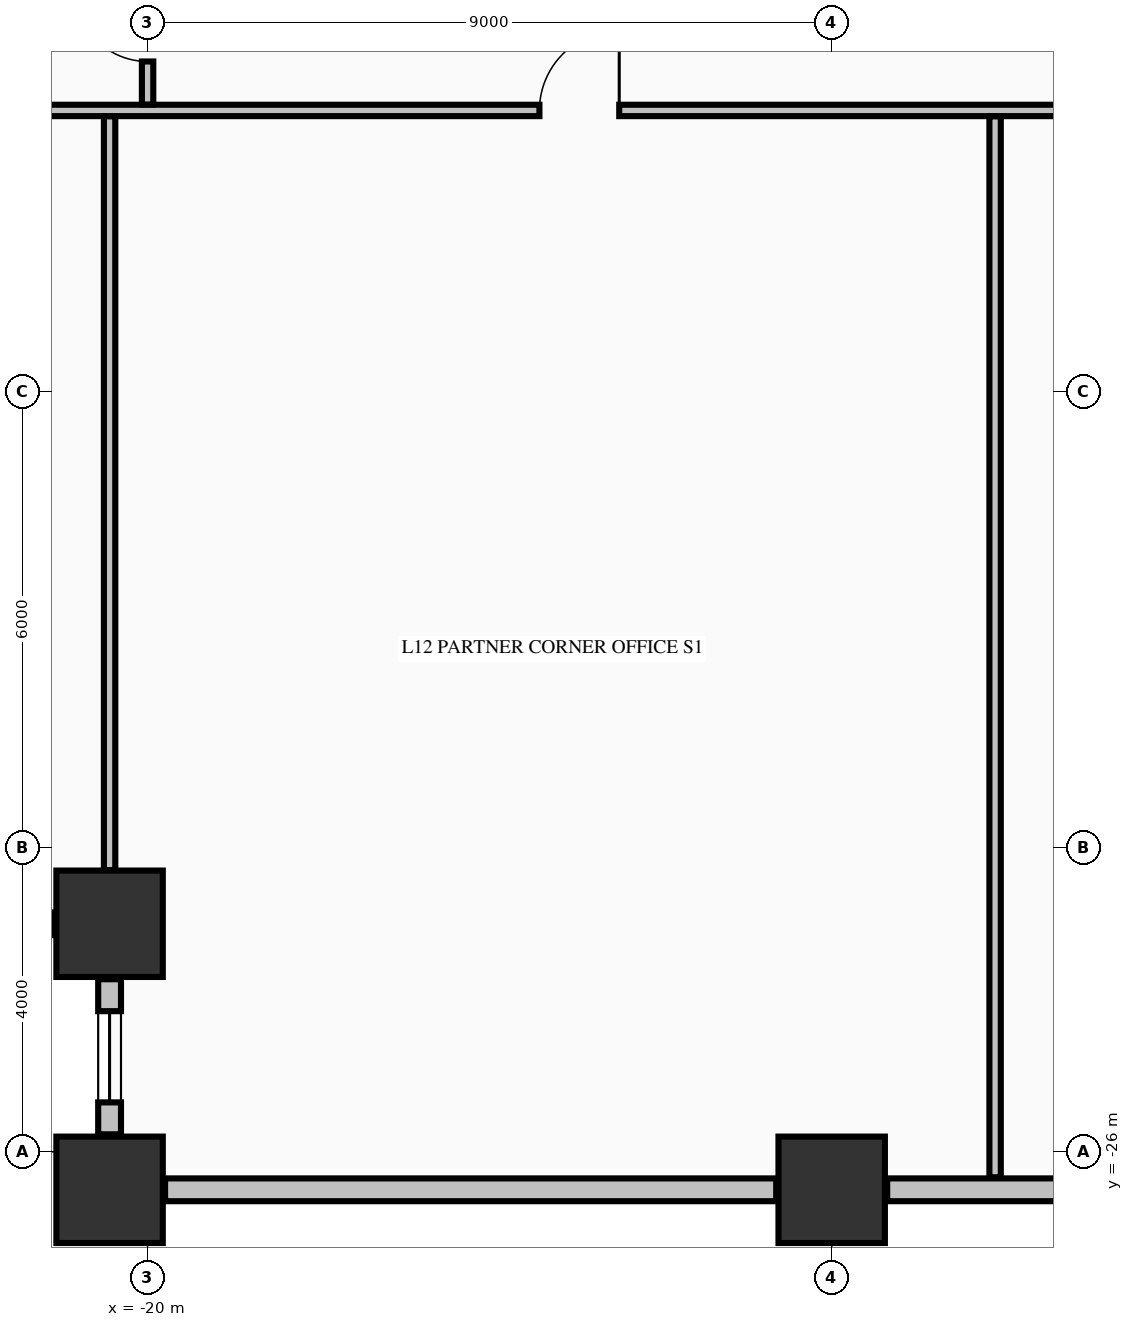
"""IFC4 building model, lengths in metres.
Left out: names, types, materials, properties, quantities, classifications, styles, units other than length and angle.
Written with IfcOpenShell. Run it as: python <this file> out.ifc"""

import sys

from ifc_helpers import new_model, si_unit, direction, frame, frame_2d, origin, origin_2d, place, context, subcontext, project, spatial, rectangle, extrude, element, fill, save


model = new_model("IFC4")
c1 = context("Model", 3, precision=1e-05, world=origin(), true_north=direction((0.0, 1.0)))
c2 = subcontext(c1, "Body", "Model", "MODEL_VIEW")
j1 = project(units=[si_unit("LENGTHUNIT", "METRE"), si_unit("PLANEANGLEUNIT", "RADIAN")], contexts=[c1])
p1 = place(None, origin())
s1 = spatial("IfcSite", under=j1, at=p1, CompositionType="ELEMENT")
p2 = place(p1, origin())
s2 = spatial("IfcBuilding", under=s1, at=p2, CompositionType="ELEMENT")
p3 = place(p2, frame((0.0, 0.0, 52.19)))
s3 = spatial("IfcBuildingStorey", under=s2, at=p3, CompositionType="ELEMENT", Elevation=52.19)
for number, where, z_axis, x_axis in (
    (1, (-20.5, -26.5, -0.425), (0.0, 0.0, 1.0), (1.0, 0.0, 0.0)),
    (2, (-11.0, -26.5, -0.425), (0.0, 0.0, 1.0), (1.0, 0.0, 0.0)),
    (3, (-20.5, -23.0, -0.425), (0.0, 0.0, 1.0), (1.0, 0.0, 0.0)),
):
    element("IfcColumn", number, at=place(p3, frame(where, z_axis=z_axis, x_axis=x_axis)), inside=s3, PredefinedType="COLUMN", context=c2, shape_type="SweptSolid", body=[
        extrude(rectangle(XDim=1.4, YDim=1.4, at=origin_2d()), origin(), (0.0, 0.0, 1.0), 5.0),
    ])
p4 = place(p3, frame((-23.27, -23.0, 0.0), z_axis=(0.0, 0.0, 1.0), x_axis=(1.0, 0.0, 0.0)))
e4 = element("IfcWall", 4, at=p4, inside=s3, PredefinedType="STANDARD", context=c2, shape_type="SweptSolid", body=[
    extrude(rectangle(XDim=2.04, YDim=0.3, at=frame_2d((1.02, 0.0))), origin(), (0.0, 0.0, 1.0), 2.167),
])
p5 = place(p3, frame((-20.5, -23.73, 0.0), z_axis=(0.0, 0.0, 1.0), x_axis=(0.0, -1.0, 0.0)))
e5 = element("IfcWall", 5, at=p5, inside=s3, PredefinedType="STANDARD", context=c2, shape_type="SweptSolid", body=[
    extrude(rectangle(XDim=2.04, YDim=0.3, at=frame_2d((1.02, 0.0))), origin(), (0.0, 0.0, 1.0), 2.767),
])
p6 = place(p5, frame((0.42, 0.0, 0.82)))
e6 = element("IfcOpeningElement", 6, at=p6, cuts=e5, PredefinedType="OPENING", context=c2, shape_type="SweptSolid", body=[
    extrude(rectangle(XDim=1.2, YDim=1.65, at=frame_2d((0.6, 0.825))), frame((0.0, 0.16, 0.0), z_axis=(0.0, -1.0, 0.0), x_axis=(1.0, 0.0, 0.0)), (0.0, 0.0, 1.0), 0.32),
])
p7 = place(p3, frame((-19.77, -26.5, 0.0), z_axis=(0.0, 0.0, 1.0), x_axis=(1.0, 0.0, 0.0)))
e7 = element("IfcWall", 7, at=p7, inside=s3, PredefinedType="STANDARD", context=c2, shape_type="SweptSolid", body=[
    extrude(rectangle(XDim=8.04, YDim=0.3, at=frame_2d((4.02, 0.0))), origin(), (0.0, 0.0, 1.0), 2.167),
])
p8 = place(p3, frame((-10.27, -26.5, 0.0), z_axis=(0.0, 0.0, 1.0), x_axis=(1.0, 0.0, 0.0)))
e8 = element("IfcWall", 8, at=p8, inside=s3, PredefinedType="STANDARD", context=c2, shape_type="SweptSolid", body=[
    extrude(rectangle(XDim=9.54, YDim=0.3, at=frame_2d((4.77, 0.0))), origin(), (0.0, 0.0, 1.0), 2.167),
])
p9 = place(p3, frame((-23.835, -12.3, 0.0), z_axis=(0.0, 0.0, 1.0), x_axis=(1.0, 0.0, 0.0)))
e9 = element("IfcWall", 9, at=p9, inside=s3, PredefinedType="PARTITIONING", context=c2, shape_type="SweptSolid", body=[
    extrude(rectangle(XDim=52.67, YDim=0.15, at=frame_2d((26.335, 0.0))), origin(), (0.0, 0.0, 1.0), 4.575),
])
p10 = place(p9, frame((8.99, 0.0, 0.0)))
e10 = element("IfcOpeningElement", 10, at=p10, cuts=e9, PredefinedType="OPENING", context=c2, shape_type="SweptSolid", body=[
    extrude(rectangle(XDim=1.05, YDim=2.15, at=frame_2d((0.525, 1.075))), frame((0.0, 0.085, 0.0), z_axis=(0.0, -1.0, 0.0), x_axis=(1.0, 0.0, 0.0)), (0.0, 0.0, 1.0), 0.17),
])
p11 = place(p9, frame((20.96, 0.0, 0.0)))
e11 = element("IfcOpeningElement", 11, at=p11, cuts=e9, PredefinedType="OPENING", context=c2, shape_type="SweptSolid", body=[
    extrude(rectangle(XDim=1.05, YDim=2.15, at=frame_2d((0.525, 1.075))), frame((0.0, 0.085, 0.0), z_axis=(0.0, -1.0, 0.0), x_axis=(1.0, 0.0, 0.0)), (0.0, 0.0, 1.0), 0.17),
])
p12 = place(p9, frame((29.11, 0.0, 0.0)))
e12 = element("IfcOpeningElement", 12, at=p12, cuts=e9, PredefinedType="OPENING", context=c2, shape_type="SweptSolid", body=[
    extrude(rectangle(XDim=1.05, YDim=2.15, at=frame_2d((0.525, 1.075))), frame((0.0, 0.085, 0.0), z_axis=(0.0, -1.0, 0.0), x_axis=(1.0, 0.0, 0.0)), (0.0, 0.0, 1.0), 0.17),
])
p13 = place(p3, frame((-20.5, -22.294, 0.0), z_axis=(0.0, 0.0, 1.0), x_axis=(0.0, 1.0, 0.0)))
e13 = element("IfcWall", 13, at=p13, inside=s3, PredefinedType="PARTITIONING", context=c2, shape_type="SweptSolid", body=[
    extrude(rectangle(XDim=9.916, YDim=0.15, at=frame_2d((4.958, 0.0))), origin(), (0.0, 0.0, 1.0), 4.575),
])
p14 = place(p3, frame((-20.0, -12.222, 0.0), z_axis=(0.0, 0.0, 1.0), x_axis=(0.0, 1.0, 0.0)))
e14 = element("IfcWall", 14, at=p14, inside=s3, PredefinedType="PARTITIONING", context=c2, shape_type="SweptSolid", body=[
    extrude(rectangle(XDim=1.666, YDim=0.15, at=frame_2d((0.833, 0.0))), origin(), (0.0, 0.0, 1.0), 4.575),
])
p15 = place(p14, frame((0.566, 0.0, 0.0)))
e15 = element("IfcOpeningElement", 15, at=p15, cuts=e14, PredefinedType="OPENING", context=c2, shape_type="SweptSolid", body=[
    extrude(rectangle(XDim=0.95, YDim=2.02, at=frame_2d((0.475, 1.01))), frame((0.0, 0.085, 0.0), z_axis=(0.0, -1.0, 0.0), x_axis=(1.0, 0.0, 0.0)), (0.0, 0.0, 1.0), 0.17),
])
p16 = place(p3, frame((-8.85, -26.335, 0.0), z_axis=(0.0, 0.0, 1.0), x_axis=(0.0, 1.0, 0.0)))
e16 = element("IfcWall", 16, at=p16, inside=s3, PredefinedType="PARTITIONING", context=c2, shape_type="SweptSolid", body=[
    extrude(rectangle(XDim=13.957, YDim=0.15, at=frame_2d((6.979, 0.0))), origin(), (0.0, 0.0, 1.0), 4.575),
])
p17 = place(p6, origin())
e17 = element("IfcWindow", 17, at=p17, inside=s3, PartitioningType="SINGLE_PANEL", PredefinedType="WINDOW", context=c2, shape_type="SweptSolid", body=[
    extrude(rectangle(XDim=1.2, YDim=1.65, at=frame_2d((0.6, 0.825))), frame((0.0, 0.03, 0.0), z_axis=(0.0, -1.0, 0.0), x_axis=(1.0, 0.0, 0.0)), (0.0, 0.0, 1.0), 0.06),
])
fill(e6, e17)
p18 = place(p10, origin())
e18 = element("IfcDoor", 18, at=p18, inside=s3, OperationType="SINGLE_SWING_RIGHT", PredefinedType="DOOR", context=c2, shape_type="SweptSolid", body=[
    extrude(rectangle(XDim=1.05, YDim=2.15, at=frame_2d((0.525, 1.075))), frame((0.0, 0.025, 0.0), z_axis=(0.0, -1.0, 0.0), x_axis=(1.0, 0.0, 0.0)), (0.0, 0.0, 1.0), 0.05),
])
fill(e10, e18)
p19 = place(p15, origin())
e19 = element("IfcDoor", 19, at=p19, inside=s3, OperationType="SINGLE_SWING_RIGHT", PredefinedType="DOOR", context=c2, shape_type="SweptSolid", body=[
    extrude(rectangle(XDim=0.95, YDim=2.02, at=frame_2d((0.475, 1.01))), frame((0.0, 0.025, 0.0), z_axis=(0.0, -1.0, 0.0), x_axis=(1.0, 0.0, 0.0)), (0.0, 0.0, 1.0), 0.05),
])
fill(e15, e19)
save(model, sys.argv[1])
